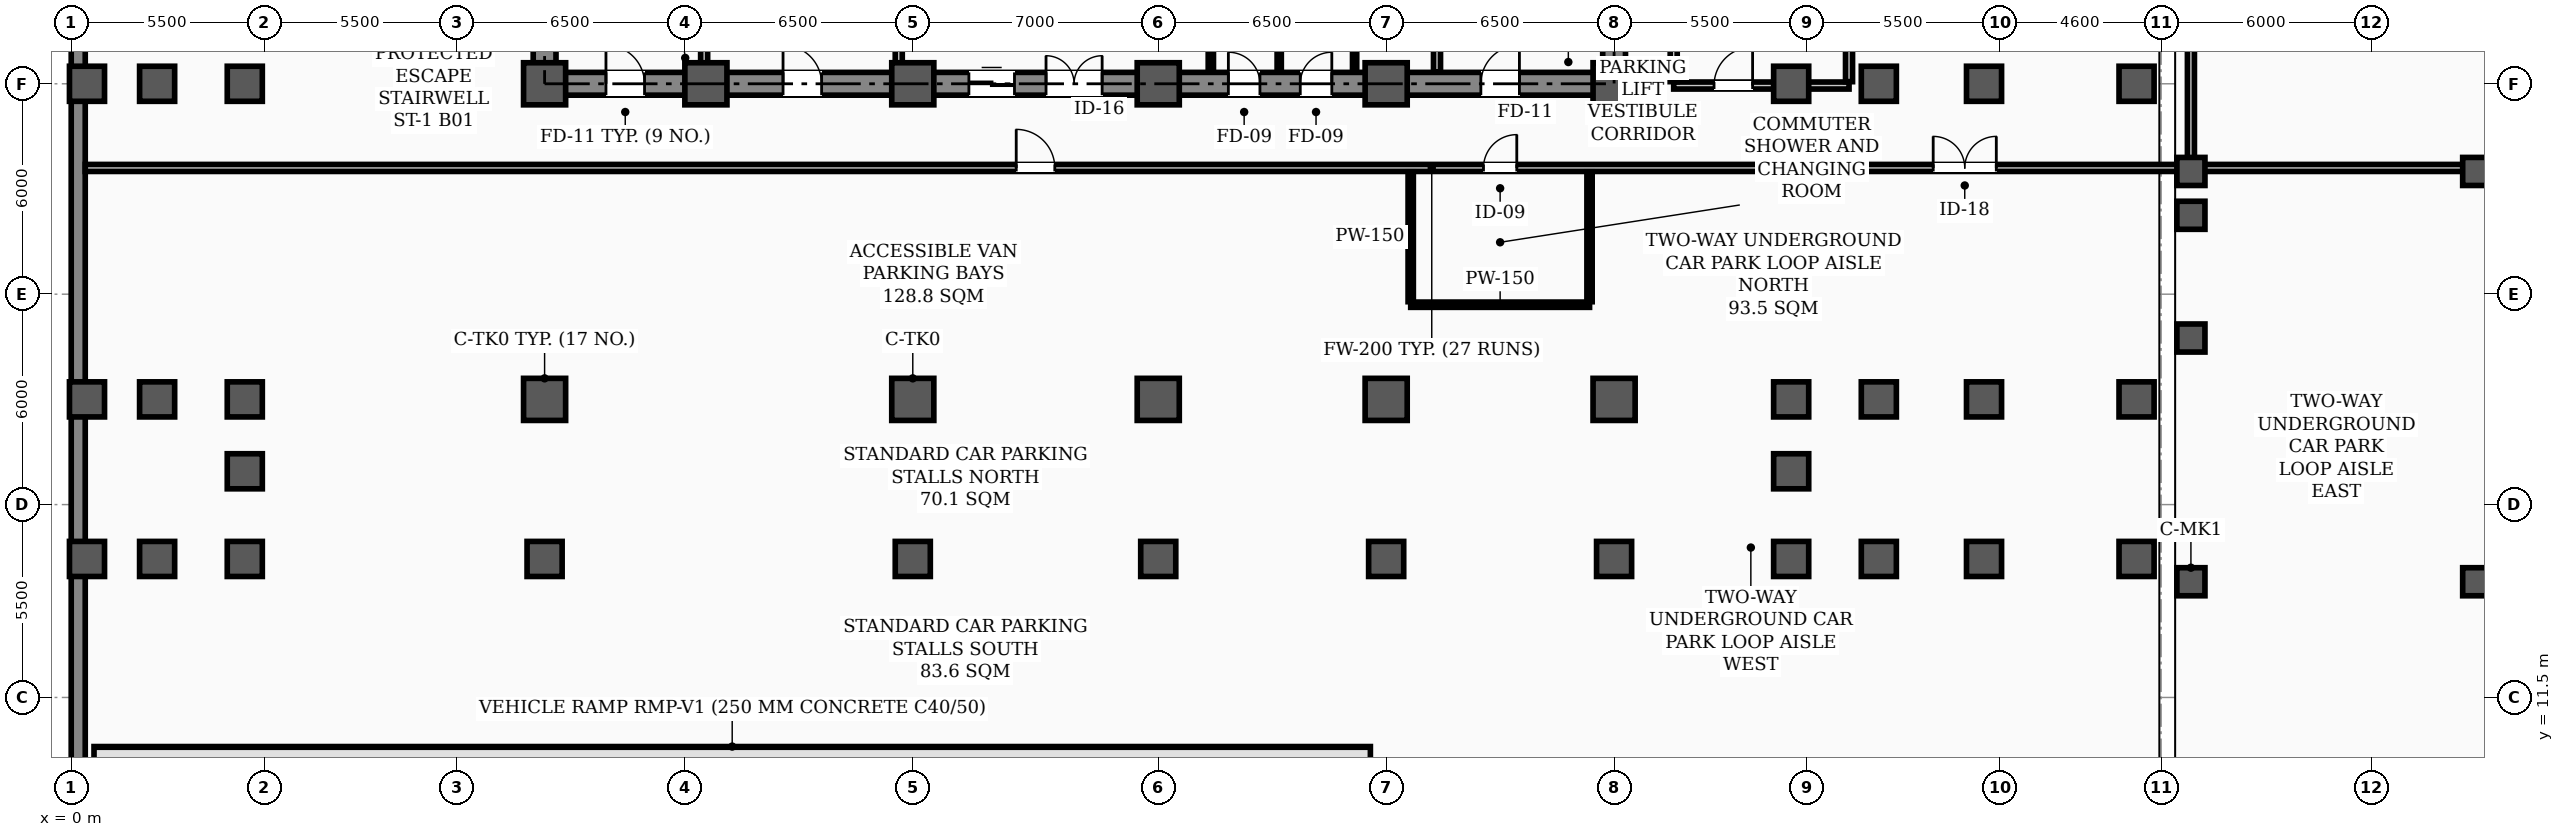
"""IFC4 building model, lengths in metres.
Left out: names, types, materials, properties, quantities, classifications, styles, units other than length and angle.
Written with IfcOpenShell. Run it as: python <this file> out.ifc"""

import sys

from ifc_helpers import new_model, si_unit, direction, frame, frame_2d, origin, origin_2d, place, context, subcontext, project, spatial, rectangle, hollow_rectangle, extrude, element, fill, save


model = new_model("IFC4")
c1 = context("Model", 3, precision=1e-05, world=origin(), true_north=direction((0.0, 1.0)))
c2 = subcontext(c1, "Body", "Model", "MODEL_VIEW")
j1 = project(units=[si_unit("LENGTHUNIT", "METRE"), si_unit("PLANEANGLEUNIT", "RADIAN")], contexts=[c1])
p1 = place(None, origin())
s1 = spatial("IfcSite", under=j1, at=p1, CompositionType="ELEMENT")
p2 = place(p1, origin())
s2 = spatial("IfcBuilding", under=s1, at=p2, CompositionType="ELEMENT")
p3 = place(p2, frame((0.0, 0.0, -5.0)))
s3 = spatial("IfcBuildingStorey", under=s2, at=p3, CompositionType="ELEMENT", Elevation=-5.0)
for number, where, z_axis, x_axis in (
    (1, (13.5, 29.0, 0.0), (0.0, 0.0, 1.0), (1.0, 0.0, 0.0)),
    (2, (18.1, 29.0, 0.0), (0.0, 0.0, 1.0), (1.0, 0.0, 0.0)),
    (3, (24.0, 29.0, 0.0), (0.0, 0.0, 1.0), (1.0, 0.0, 0.0)),
    (4, (31.0, 29.0, 0.0), (0.0, 0.0, 1.0), (1.0, 0.0, 0.0)),
    (5, (37.5, 29.0, 0.0), (0.0, 0.0, 1.0), (1.0, 0.0, 0.0)),
    (6, (44.0, 29.0, 0.0), (0.0, 0.0, 1.0), (1.0, 0.0, 0.0)),
    (7, (13.5, 20.0, 0.0), (0.0, 0.0, 1.0), (1.0, 0.0, 0.0)),
    (8, (24.0, 20.0, 0.0), (0.0, 0.0, 1.0), (1.0, 0.0, 0.0)),
    (9, (31.0, 20.0, 0.0), (0.0, 0.0, 1.0), (1.0, 0.0, 0.0)),
    (10, (37.5, 20.0, 0.0), (0.0, 0.0, 1.0), (1.0, 0.0, 0.0)),
    (11, (44.0, 20.0, 0.0), (0.0, 0.0, 1.0), (1.0, 0.0, 0.0)),
):
    element("IfcColumn", number, at=place(p3, frame(where, z_axis=z_axis, x_axis=x_axis)), inside=s3, PredefinedType="COLUMN", context=c2, shape_type="SweptSolid", body=[
        extrude(hollow_rectangle(XDim=1.2, YDim=1.2, WallThickness=0.04, InnerFilletRadius=0.02, OuterFilletRadius=0.06, at=origin_2d()), origin(), (0.0, 0.0, 1.0), 5.0),
    ])
for number, where, z_axis, x_axis in (
    (12, (0.45, 15.45, 0.0), (0.0, 0.0, 1.0), (1.0, 0.0, 0.0)),
    (13, (0.45, 20.0, 0.0), (0.0, 0.0, 1.0), (1.0, 0.0, 0.0)),
    (14, (0.45, 29.0, 0.0), (0.0, 0.0, 1.0), (1.0, 0.0, 0.0)),
    (15, (2.45, 15.45, 0.0), (0.0, 0.0, 1.0), (1.0, 0.0, 0.0)),
    (16, (2.45, 20.0, 0.0), (0.0, 0.0, 1.0), (1.0, 0.0, 0.0)),
    (17, (2.45, 29.0, 0.0), (0.0, 0.0, 1.0), (1.0, 0.0, 0.0)),
    (18, (4.95, 15.45, 0.0), (0.0, 0.0, 1.0), (1.0, 0.0, 0.0)),
    (19, (4.95, 17.95, 0.0), (0.0, 0.0, 1.0), (1.0, 0.0, 0.0)),
    (20, (4.95, 20.0, 0.0), (0.0, 0.0, 1.0), (1.0, 0.0, 0.0)),
    (21, (4.95, 29.0, 0.0), (0.0, 0.0, 1.0), (1.0, 0.0, 0.0)),
    (22, (13.5, 15.45, 0.0), (0.0, 0.0, 1.0), (1.0, 0.0, 0.0)),
    (23, (24.0, 15.45, 0.0), (0.0, 0.0, 1.0), (1.0, 0.0, 0.0)),
    (24, (31.0, 15.45, 0.0), (0.0, 0.0, 1.0), (1.0, 0.0, 0.0)),
    (25, (37.5, 15.45, 0.0), (0.0, 0.0, 1.0), (1.0, 0.0, 0.0)),
    (26, (44.0, 15.45, 0.0), (0.0, 0.0, 1.0), (1.0, 0.0, 0.0)),
    (27, (49.05, 15.45, 0.0), (0.0, 0.0, 1.0), (1.0, 0.0, 0.0)),
    (28, (49.05, 17.95, 0.0), (0.0, 0.0, 1.0), (1.0, 0.0, 0.0)),
    (29, (49.05, 20.0, 0.0), (0.0, 0.0, 1.0), (1.0, 0.0, 0.0)),
    (30, (49.05, 29.0, 0.0), (0.0, 0.0, 1.0), (1.0, 0.0, 0.0)),
    (31, (51.55, 15.45, 0.0), (0.0, 0.0, 1.0), (1.0, 0.0, 0.0)),
    (32, (51.55, 20.0, 0.0), (0.0, 0.0, 1.0), (1.0, 0.0, 0.0)),
    (33, (51.55, 29.0, 0.0), (0.0, 0.0, 1.0), (1.0, 0.0, 0.0)),
    (34, (54.55, 15.45, 0.0), (0.0, 0.0, 1.0), (1.0, 0.0, 0.0)),
    (35, (54.55, 20.0, 0.0), (0.0, 0.0, 1.0), (1.0, 0.0, 0.0)),
    (36, (54.55, 29.0, 0.0), (0.0, 0.0, 1.0), (1.0, 0.0, 0.0)),
    (37, (58.9, 15.45, 0.0), (0.0, 0.0, 1.0), (1.0, 0.0, 0.0)),
    (38, (58.9, 20.0, 0.0), (0.0, 0.0, 1.0), (1.0, 0.0, 0.0)),
    (39, (58.9, 29.0, 0.0), (0.0, 0.0, 1.0), (1.0, 0.0, 0.0)),
):
    element("IfcColumn", number, at=place(p3, frame(where, z_axis=z_axis, x_axis=x_axis)), inside=s3, PredefinedType="COLUMN", context=c2, shape_type="SweptSolid", body=[
        extrude(rectangle(XDim=1.0, YDim=1.0, at=origin_2d()), origin(), (0.0, 0.0, 1.0), 5.0),
    ])
for number, where, z_axis, x_axis in (
    (40, (60.45, 14.8, 0.0), (0.0, 0.0, 1.0), (1.0, 0.0, 0.0)),
    (41, (60.45, 21.75, 0.0), (0.0, 0.0, 1.0), (1.0, 0.0, 0.0)),
    (42, (60.45, 25.25, 0.0), (0.0, 0.0, 1.0), (1.0, 0.0, 0.0)),
    (43, (60.45, 26.5, 0.0), (0.0, 0.0, 1.0), (1.0, 0.0, 0.0)),
    (44, (68.6, 14.8, 0.0), (0.0, 0.0, 1.0), (1.0, 0.0, 0.0)),
    (45, (68.6, 26.5, 0.0), (0.0, 0.0, 1.0), (1.0, 0.0, 0.0)),
):
    element("IfcColumn", number, at=place(p3, frame(where, z_axis=z_axis, x_axis=x_axis)), inside=s3, PredefinedType="COLUMN", context=c2, shape_type="SweptSolid", body=[
        extrude(rectangle(XDim=0.8, YDim=0.8, at=origin_2d()), origin(), (0.0, 0.0, 1.0), 5.0),
    ])
p4 = place(p3, frame((0.2, 51.4, 0.0), z_axis=(0.0, 0.0, 1.0), x_axis=(0.0, -1.0, 0.0)))
e46 = element("IfcWall", 46, at=p4, inside=s3, PredefinedType="SOLIDWALL", context=c2, shape_type="SweptSolid", body=[
    extrude(rectangle(XDim=51.2, YDim=0.4, at=frame_2d((25.6, 0.0))), origin(), (0.0, 0.0, 1.0), 4.75),
])
p5 = place(p3, frame((13.5, 29.0, 0.0), z_axis=(0.0, 0.0, 1.0), x_axis=(1.0, 0.0, 0.0)))
e47 = element("IfcWall", 47, at=p5, inside=s3, PredefinedType="SHEAR", context=c2, shape_type="SweptSolid", body=[
    extrude(rectangle(XDim=30.5, YDim=0.65, at=frame_2d((15.25, 0.0))), origin(), (0.0, 0.0, 1.0), 4.75),
])
p6 = place(p5, frame((1.75, 0.0, 0.0)))
e48 = element("IfcOpeningElement", 48, at=p6, cuts=e47, PredefinedType="OPENING", context=c2, shape_type="SweptSolid", body=[
    extrude(rectangle(XDim=1.1, YDim=2.08, at=frame_2d((0.55, 1.04))), frame((0.0, 0.335, 0.0), z_axis=(0.0, -1.0, 0.0), x_axis=(1.0, 0.0, 0.0)), (0.0, 0.0, 1.0), 0.67),
])
p7 = place(p5, frame((26.7, 0.0, 0.0)))
e49 = element("IfcOpeningElement", 49, at=p7, cuts=e47, PredefinedType="OPENING", context=c2, shape_type="SweptSolid", body=[
    extrude(rectangle(XDim=1.1, YDim=2.08, at=frame_2d((0.55, 1.04))), frame((0.0, 0.335, 0.0), z_axis=(0.0, -1.0, 0.0), x_axis=(1.0, 0.0, 0.0)), (0.0, 0.0, 1.0), 0.67),
])
p8 = place(p5, frame((6.8, 0.0, 0.0)))
e50 = element("IfcOpeningElement", 50, at=p8, cuts=e47, PredefinedType="OPENING", context=c2, shape_type="SweptSolid", body=[
    extrude(rectangle(XDim=1.1, YDim=2.08, at=frame_2d((0.55, 1.04))), frame((0.0, 0.335, 0.0), z_axis=(0.0, -1.0, 0.0), x_axis=(1.0, 0.0, 0.0)), (0.0, 0.0, 1.0), 0.67),
])
p9 = place(p5, frame((14.3, 0.0, 0.0)))
e51 = element("IfcOpeningElement", 51, at=p9, cuts=e47, PredefinedType="OPENING", context=c2, shape_type="SweptSolid", body=[
    extrude(rectangle(XDim=1.6, YDim=2.08, at=frame_2d((0.8, 1.04))), frame((0.0, 0.335, 0.0), z_axis=(0.0, -1.0, 0.0), x_axis=(1.0, 0.0, 0.0)), (0.0, 0.0, 1.0), 0.67),
])
p10 = place(p5, frame((19.5, 0.0, 0.0)))
e52 = element("IfcOpeningElement", 52, at=p10, cuts=e47, PredefinedType="OPENING", context=c2, shape_type="SweptSolid", body=[
    extrude(rectangle(XDim=0.9, YDim=2.08, at=frame_2d((0.45, 1.04))), frame((0.0, 0.335, 0.0), z_axis=(0.0, -1.0, 0.0), x_axis=(1.0, 0.0, 0.0)), (0.0, 0.0, 1.0), 0.67),
])
p11 = place(p5, frame((21.55, 0.0, 0.0)))
e53 = element("IfcOpeningElement", 53, at=p11, cuts=e47, PredefinedType="OPENING", context=c2, shape_type="SweptSolid", body=[
    extrude(rectangle(XDim=0.9, YDim=2.08, at=frame_2d((0.45, 1.04))), frame((0.0, 0.335, 0.0), z_axis=(0.0, -1.0, 0.0), x_axis=(1.0, 0.0, 0.0)), (0.0, 0.0, 1.0), 0.67),
])
p12 = place(p5, frame((12.1, 0.0, 0.0)))
e54 = element("IfcOpeningElement", 54, at=p12, cuts=e47, PredefinedType="OPENING", context=c2, shape_type="SweptSolid", body=[
    extrude(rectangle(XDim=1.3, YDim=2.08, at=frame_2d((0.65, 1.04))), frame((0.0, 0.335, 0.0), z_axis=(0.0, -1.0, 0.0), x_axis=(1.0, 0.0, 0.0)), (0.0, 0.0, 1.0), 0.67),
])
for number, where, z_axis, x_axis in (
    (55, (13.5, 29.35, 0.0), (0.0, 0.0, 1.0), (0.0, 1.0, 0.0)),
    (56, (44.0, 29.35, 0.0), (0.0, 0.0, 1.0), (0.0, 1.0, 0.0)),
):
    element("IfcWall", number, at=place(p3, frame(where, z_axis=z_axis, x_axis=x_axis)), inside=s3, PredefinedType="SHEAR", context=c2, shape_type="SweptSolid", body=[
        extrude(rectangle(XDim=8.6, YDim=0.65, at=frame_2d((4.3, 0.0))), origin(), (0.0, 0.0, 1.0), 4.75),
    ])
p13 = place(p3, frame((0.4, 26.6, 0.0), z_axis=(0.0, 0.0, 1.0), x_axis=(1.0, 0.0, 0.0)))
e57 = element("IfcWall", 57, at=p13, inside=s3, PredefinedType="STANDARD", context=c2, shape_type="SweptSolid", body=[
    extrude(rectangle(XDim=76.8, YDim=0.2, at=frame_2d((38.4, 0.0))), origin(), (0.0, 0.0, 1.0), 4.03),
])
p14 = place(p13, frame((26.55, 0.0, 0.0)))
e58 = element("IfcOpeningElement", 58, at=p14, cuts=e57, PredefinedType="OPENING", context=c2, shape_type="SweptSolid", body=[
    extrude(rectangle(XDim=1.1, YDim=2.08, at=frame_2d((0.55, 1.04))), frame((0.0, 0.11, 0.0), z_axis=(0.0, -1.0, 0.0), x_axis=(1.0, 0.0, 0.0)), (0.0, 0.0, 1.0), 0.22),
])
p15 = place(p13, frame((39.875, 0.0, 0.0)))
e59 = element("IfcOpeningElement", 59, at=p15, cuts=e57, PredefinedType="OPENING", context=c2, shape_type="SweptSolid", body=[
    extrude(rectangle(XDim=0.95, YDim=2.08, at=frame_2d((0.475, 1.04))), frame((0.0, 0.11, 0.0), z_axis=(0.0, -1.0, 0.0), x_axis=(1.0, 0.0, 0.0)), (0.0, 0.0, 1.0), 0.22),
])
p16 = place(p13, frame((52.7, 0.0, 0.0)))
e60 = element("IfcOpeningElement", 60, at=p16, cuts=e57, PredefinedType="OPENING", context=c2, shape_type="SweptSolid", body=[
    extrude(rectangle(XDim=1.8, YDim=2.08, at=frame_2d((0.9, 1.04))), frame((0.0, 0.11, 0.0), z_axis=(0.0, -1.0, 0.0), x_axis=(1.0, 0.0, 0.0)), (0.0, 0.0, 1.0), 0.22),
])
p17 = place(p3, frame((38.2, 22.7, 0.0), z_axis=(0.0, 0.0, 1.0), x_axis=(1.0, 0.0, 0.0)))
e61 = element("IfcWall", 61, at=p17, inside=s3, PredefinedType="PARTITIONING", context=c2, shape_type="SweptSolid", body=[
    extrude(rectangle(XDim=5.1, YDim=0.15, at=frame_2d((2.55, 0.0))), origin(), (0.0, 0.0, 1.0), 4.28),
])
p18 = place(p3, frame((45.7, 28.95, 0.0), z_axis=(0.0, 0.0, 1.0), x_axis=(1.0, 0.0, 0.0)))
e62 = element("IfcWall", 62, at=p18, inside=s3, PredefinedType="STANDARD", context=c2, shape_type="SweptSolid", body=[
    extrude(rectangle(XDim=5.0, YDim=0.2, at=frame_2d((2.5, 0.0))), origin(), (0.0, 0.0, 1.0), 3.63),
])
p19 = place(p18, frame((1.15, 0.0, 0.0)))
e63 = element("IfcOpeningElement", 63, at=p19, cuts=e62, PredefinedType="OPENING", context=c2, shape_type="SweptSolid", body=[
    extrude(rectangle(XDim=1.1, YDim=2.08, at=frame_2d((0.55, 1.04))), frame((0.0, 0.11, 0.0), z_axis=(0.0, -1.0, 0.0), x_axis=(1.0, 0.0, 0.0)), (0.0, 0.0, 1.0), 0.22),
])
for number, where, z_axis, x_axis in (
    (64, (38.2, 22.785, 0.0), (0.0, 0.0, 1.0), (0.0, 1.0, 0.0)),
    (65, (43.3, 22.785, 0.0), (0.0, 0.0, 1.0), (0.0, 1.0, 0.0)),
):
    element("IfcWall", number, at=place(p3, frame(where, z_axis=z_axis, x_axis=x_axis)), inside=s3, PredefinedType="PARTITIONING", context=c2, shape_type="SweptSolid", body=[
        extrude(rectangle(XDim=3.705, YDim=0.15, at=frame_2d((1.853, 0.0))), origin(), (0.0, 0.0, 1.0), 4.75),
    ])
for number, where, z_axis, x_axis in (
    (66, (45.7, 29.06, 0.0), (0.0, 0.0, 1.0), (0.0, 1.0, 0.0)),
    (67, (50.7, 29.06, 0.0), (0.0, 0.0, 1.0), (0.0, 1.0, 0.0)),
):
    element("IfcWall", number, at=place(p3, frame(where, z_axis=z_axis, x_axis=x_axis)), inside=s3, PredefinedType="STANDARD", context=c2, shape_type="SweptSolid", body=[
        extrude(rectangle(XDim=8.73, YDim=0.2, at=frame_2d((4.365, 0.0))), origin(), (0.0, 0.0, 1.0), 3.63),
    ])
p20 = place(p3, frame((60.45, 26.71, 0.0), z_axis=(0.0, 0.0, 1.0), x_axis=(0.0, 1.0, 0.0)))
e68 = element("IfcWall", 68, at=p20, inside=s3, PredefinedType="STANDARD", context=c2, shape_type="SweptSolid", body=[
    extrude(rectangle(XDim=24.49, YDim=0.2, at=frame_2d((12.245, 0.0))), origin(), (0.0, 0.0, 1.0), 4.03),
])
p21 = place(p20, frame((4.54, 0.0, 0.0)))
e69 = element("IfcOpeningElement", 69, at=p21, cuts=e68, PredefinedType="OPENING", context=c2, shape_type="SweptSolid", body=[
    extrude(rectangle(XDim=1.1, YDim=2.08, at=frame_2d((0.55, 1.04))), frame((0.0, 0.11, 0.0), z_axis=(0.0, -1.0, 0.0), x_axis=(1.0, 0.0, 0.0)), (0.0, 0.0, 1.0), 0.22),
])
for number, where, z_axis, x_axis in (
    (70, (18.05, 29.335, 0.0), (0.0, 0.0, 1.0), (0.0, 1.0, 0.0)),
    (71, (38.95, 29.335, 0.0), (0.0, 0.0, 1.0), (0.0, 1.0, 0.0)),
):
    element("IfcWall", number, at=place(p3, frame(where, z_axis=z_axis, x_axis=x_axis)), inside=s3, PredefinedType="STANDARD", context=c2, shape_type="SweptSolid", body=[
        extrude(rectangle(XDim=0.965, YDim=0.2, at=frame_2d((0.482, 0.0))), origin(), (0.0, 0.0, 1.0), 3.63),
    ])
p22 = place(p3, frame((23.6, 29.335, 0.0), z_axis=(0.0, 0.0, 1.0), x_axis=(0.0, 1.0, 0.0)))
e72 = element("IfcWall", 72, at=p22, inside=s3, PredefinedType="STANDARD", context=c2, shape_type="SweptSolid", body=[
    extrude(rectangle(XDim=5.365, YDim=0.2, at=frame_2d((2.683, 0.0))), origin(), (0.0, 0.0, 1.0), 3.63),
])
p23 = place(p3, frame((32.5, 29.335, 0.0), z_axis=(0.0, 0.0, 1.0), x_axis=(0.0, 1.0, 0.0)))
e73 = element("IfcWall", 73, at=p23, inside=s3, PredefinedType="PARTITIONING", context=c2, shape_type="SweptSolid", body=[
    extrude(rectangle(XDim=2.43, YDim=0.15, at=frame_2d((1.215, 0.0))), origin(), (0.0, 0.0, 1.0), 3.63),
])
for number, where, z_axis, x_axis in (
    (74, (36.6, 29.335, 0.0), (0.0, 0.0, 1.0), (0.0, 1.0, 0.0)),
    (75, (34.45, 29.335, 0.0), (0.0, 0.0, 1.0), (0.0, 1.0, 0.0)),
):
    element("IfcWall", number, at=place(p3, frame(where, z_axis=z_axis, x_axis=x_axis)), inside=s3, PredefinedType="PARTITIONING", context=c2, shape_type="SweptSolid", body=[
        extrude(rectangle(XDim=2.43, YDim=0.12, at=frame_2d((1.215, 0.0))), origin(), (0.0, 0.0, 1.0), 3.63),
    ])
p24 = place(p14, origin())
e76 = element("IfcDoor", 76, at=p24, inside=s3, OperationType="SINGLE_SWING_LEFT", PredefinedType="DOOR", context=c2, shape_type="SweptSolid", body=[
    extrude(rectangle(XDim=1.1, YDim=2.08, at=frame_2d((0.55, 1.04))), frame((0.0, 0.025, 0.0), z_axis=(0.0, -1.0, 0.0), x_axis=(1.0, 0.0, 0.0)), (0.0, 0.0, 1.0), 0.05),
])
fill(e58, e76)
p25 = place(p15, origin())
e77 = element("IfcDoor", 77, at=p25, inside=s3, OperationType="SINGLE_SWING_RIGHT", PredefinedType="DOOR", context=c2, shape_type="SweptSolid", body=[
    extrude(rectangle(XDim=0.95, YDim=2.08, at=frame_2d((0.475, 1.04))), frame((0.0, 0.025, 0.0), z_axis=(0.0, -1.0, 0.0), x_axis=(1.0, 0.0, 0.0)), (0.0, 0.0, 1.0), 0.05),
])
fill(e59, e77)
p26 = place(p16, origin())
e78 = element("IfcDoor", 78, at=p26, inside=s3, OperationType="DOUBLE_DOOR_SINGLE_SWING", PredefinedType="DOOR", context=c2, shape_type="SweptSolid", body=[
    extrude(rectangle(XDim=1.8, YDim=2.08, at=frame_2d((0.9, 1.04))), frame((0.0, 0.025, 0.0), z_axis=(0.0, -1.0, 0.0), x_axis=(1.0, 0.0, 0.0)), (0.0, 0.0, 1.0), 0.05),
])
fill(e60, e78)
p27 = place(p19, origin())
e79 = element("IfcDoor", 79, at=p27, inside=s3, OperationType="SINGLE_SWING_RIGHT", PredefinedType="DOOR", context=c2, shape_type="SweptSolid", body=[
    extrude(rectangle(XDim=1.1, YDim=2.08, at=frame_2d((0.55, 1.04))), frame((0.0, 0.025, 0.0), z_axis=(0.0, -1.0, 0.0), x_axis=(1.0, 0.0, 0.0)), (0.0, 0.0, 1.0), 0.05),
])
fill(e63, e79)
p28 = place(p6, origin())
e80 = element("IfcDoor", 80, at=p28, inside=s3, OperationType="SINGLE_SWING_LEFT", PredefinedType="DOOR", context=c2, shape_type="SweptSolid", body=[
    extrude(rectangle(XDim=1.1, YDim=2.08, at=frame_2d((0.55, 1.04))), frame((0.0, 0.025, 0.0), z_axis=(0.0, -1.0, 0.0), x_axis=(1.0, 0.0, 0.0)), (0.0, 0.0, 1.0), 0.05),
])
fill(e48, e80)
p29 = place(p7, origin())
e81 = element("IfcDoor", 81, at=p29, inside=s3, OperationType="SINGLE_SWING_RIGHT", PredefinedType="DOOR", context=c2, shape_type="SweptSolid", body=[
    extrude(rectangle(XDim=1.1, YDim=2.08, at=frame_2d((0.55, 1.04))), frame((0.0, 0.025, 0.0), z_axis=(0.0, -1.0, 0.0), x_axis=(1.0, 0.0, 0.0)), (0.0, 0.0, 1.0), 0.05),
])
fill(e49, e81)
p30 = place(p8, origin())
e82 = element("IfcDoor", 82, at=p30, inside=s3, OperationType="SINGLE_SWING_LEFT", PredefinedType="DOOR", context=c2, shape_type="SweptSolid", body=[
    extrude(rectangle(XDim=1.1, YDim=2.08, at=frame_2d((0.55, 1.04))), frame((0.0, 0.025, 0.0), z_axis=(0.0, -1.0, 0.0), x_axis=(1.0, 0.0, 0.0)), (0.0, 0.0, 1.0), 0.05),
])
fill(e50, e82)
p31 = place(p9, origin())
e83 = element("IfcDoor", 83, at=p31, inside=s3, OperationType="DOUBLE_DOOR_SINGLE_SWING", PredefinedType="DOOR", context=c2, shape_type="SweptSolid", body=[
    extrude(rectangle(XDim=1.6, YDim=2.08, at=frame_2d((0.8, 1.04))), frame((0.0, 0.025, 0.0), z_axis=(0.0, -1.0, 0.0), x_axis=(1.0, 0.0, 0.0)), (0.0, 0.0, 1.0), 0.05),
])
fill(e51, e83)
p32 = place(p10, origin())
e84 = element("IfcDoor", 84, at=p32, inside=s3, OperationType="SINGLE_SWING_LEFT", PredefinedType="DOOR", context=c2, shape_type="SweptSolid", body=[
    extrude(rectangle(XDim=0.9, YDim=2.08, at=frame_2d((0.45, 1.04))), frame((0.0, 0.025, 0.0), z_axis=(0.0, -1.0, 0.0), x_axis=(1.0, 0.0, 0.0)), (0.0, 0.0, 1.0), 0.05),
])
fill(e52, e84)
p33 = place(p11, origin())
e85 = element("IfcDoor", 85, at=p33, inside=s3, OperationType="SINGLE_SWING_RIGHT", PredefinedType="DOOR", context=c2, shape_type="SweptSolid", body=[
    extrude(rectangle(XDim=0.9, YDim=2.08, at=frame_2d((0.45, 1.04))), frame((0.0, 0.025, 0.0), z_axis=(0.0, -1.0, 0.0), x_axis=(1.0, 0.0, 0.0)), (0.0, 0.0, 1.0), 0.05),
])
fill(e53, e85)
p34 = place(p12, origin())
e86 = element("IfcDoor", 86, at=p34, inside=s3, OperationType="DOUBLE_DOOR_SLIDING", PredefinedType="DOOR", context=c2, shape_type="SweptSolid", body=[
    extrude(rectangle(XDim=1.3, YDim=2.08, at=frame_2d((0.65, 1.04))), frame((0.0, 0.025, 0.0), z_axis=(0.0, -1.0, 0.0), x_axis=(1.0, 0.0, 0.0)), (0.0, 0.0, 1.0), 0.05),
])
fill(e54, e86)
save(model, sys.argv[1])
